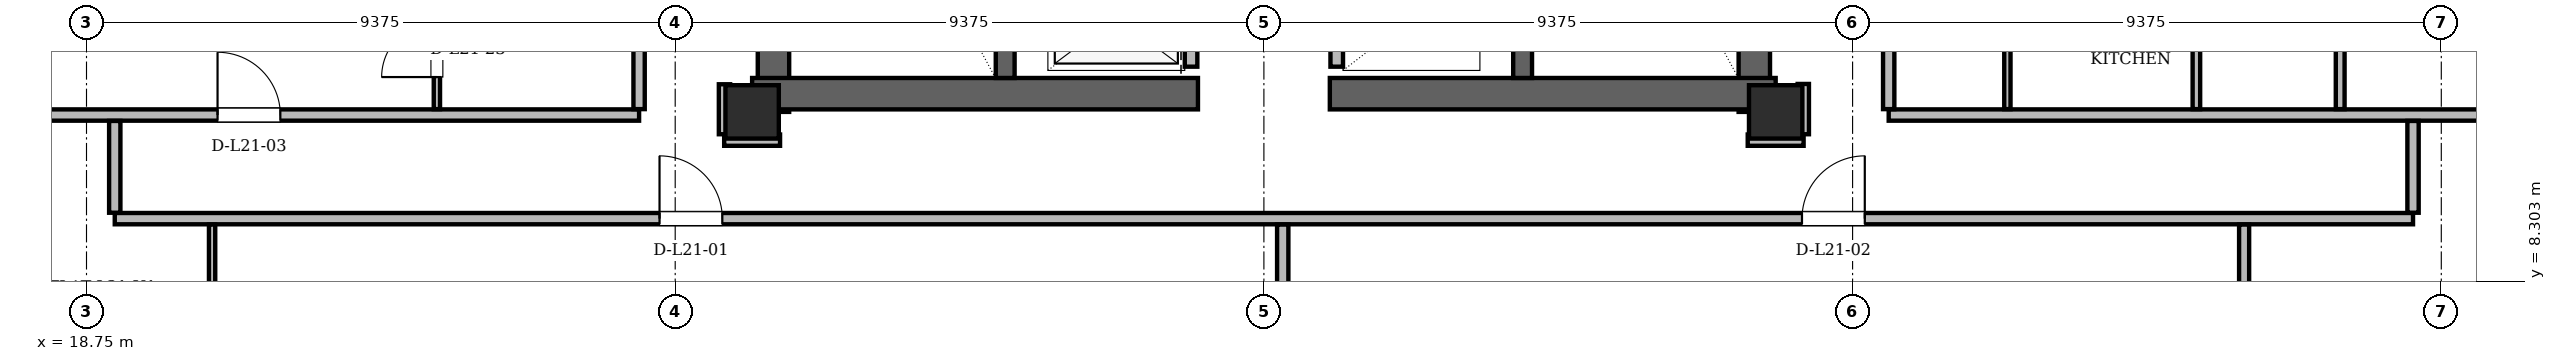
"""IFC4 building model, lengths in metres.
Left out: names, types, materials, properties, quantities, classifications, styles, units other than length and angle.
Written with IfcOpenShell. Run it as: python <this file> out.ifc"""

import sys

from ifc_helpers import new_model, si_unit, direction, frame, frame_2d, origin, origin_2d, place, context, subcontext, project, spatial, rectangle, hollow_rectangle, extrude, element, fill, save


model = new_model("IFC4")
c1 = context("Model", 3, precision=1e-05, world=origin(), true_north=direction((0.0, 1.0)))
c2 = subcontext(c1, "Body", "Model", "MODEL_VIEW")
j1 = project(units=[si_unit("LENGTHUNIT", "METRE"), si_unit("PLANEANGLEUNIT", "RADIAN")], contexts=[c1])
p1 = place(None, origin())
s1 = spatial("IfcSite", under=j1, at=p1, CompositionType="ELEMENT")
p2 = place(p1, origin())
s2 = spatial("IfcBuilding", under=s1, at=p2, CompositionType="ELEMENT")
p3 = place(p2, frame((0.0, 0.0, 82.5)))
s3 = spatial("IfcBuildingStorey", under=s2, at=p3, CompositionType="ELEMENT", Elevation=82.5)
for number, where, z_axis, x_axis in (
    (1, (29.35, 11.0, 0.0), (0.0, 0.0, 1.0), (1.0, 0.0, 0.0)),
    (2, (45.65, 11.0, 0.0), (0.0, 0.0, 1.0), (1.0, 0.0, 0.0)),
):
    element("IfcColumn", number, at=place(p3, frame(where, z_axis=z_axis, x_axis=x_axis)), inside=s3, PredefinedType="COLUMN", context=c2, shape_type="SweptSolid", body=[
        extrude(hollow_rectangle(XDim=0.85, YDim=0.85, WallThickness=0.07, at=origin_2d()), origin(), (0.0, 0.0, 1.0), 3.6),
    ])
for number, where, z_axis, x_axis in (
    (3, (29.69, 11.0, 0.0), (0.0, 0.0, 1.0), (0.0, 1.0, 0.0)),
    (4, (45.31, 11.0, 0.0), (0.0, 0.0, 1.0), (0.0, 1.0, 0.0)),
):
    element("IfcWall", number, at=place(p3, frame(where, z_axis=z_axis, x_axis=x_axis)), inside=s3, PredefinedType="SHEAR", context=c2, shape_type="SweptSolid", body=[
        extrude(rectangle(XDim=13.3, YDim=0.5, at=frame_2d((6.65, 0.0))), origin(), (0.0, 0.0, 1.0), 3.36),
    ])
for number, where, z_axis, x_axis in (
    (5, (29.35, 11.29, 0.0), (0.0, 0.0, 1.0), (1.0, 0.0, 0.0)),
    (6, (38.55, 11.29, 0.0), (0.0, 0.0, 1.0), (1.0, 0.0, 0.0)),
):
    element("IfcWall", number, at=place(p3, frame(where, z_axis=z_axis, x_axis=x_axis)), inside=s3, PredefinedType="SHEAR", context=c2, shape_type="SweptSolid", body=[
        extrude(rectangle(XDim=7.1, YDim=0.5, at=frame_2d((3.55, 0.0))), origin(), (0.0, 0.0, 1.0), 3.36),
    ])
for number, where, z_axis, x_axis in (
    (7, (33.38, 11.54, 0.0), (0.0, 0.0, 1.0), (0.0, 1.0, 0.0)),
    (8, (41.62, 11.54, 0.0), (0.0, 0.0, 1.0), (0.0, 1.0, 0.0)),
):
    element("IfcWall", number, at=place(p3, frame(where, z_axis=z_axis, x_axis=x_axis)), inside=s3, PredefinedType="SHEAR", context=c2, shape_type="SweptSolid", body=[
        extrude(rectangle(XDim=7.62, YDim=0.3, at=frame_2d((3.81, 0.0))), origin(), (0.0, 0.0, 1.0), 3.36),
    ])
for number, where, z_axis, x_axis in (
    (9, (14.025, 13.961, 0.0), (0.0, 0.0, 1.0), (0.5, -0.866, 0.0)),
    (10, (54.554, 2.839, 0.0), (0.0, 0.0, 1.0), (0.5, 0.866, 0.0)),
):
    element("IfcWall", number, at=place(p3, frame(where, z_axis=z_axis, x_axis=x_axis)), inside=s3, PredefinedType="SOLIDWALL", context=c2, shape_type="SweptSolid", body=[
        extrude(rectangle(XDim=12.842, YDim=0.34, at=frame_2d((6.421, 0.0))), origin(), (0.0, 0.0, 1.0), 2.578),
    ])
p4 = place(p3, frame((36.34, 11.72, 0.0), z_axis=(0.0, 0.0, 1.0), x_axis=(0.0, 1.0, 0.0)))
e11 = element("IfcWall", 11, at=p4, inside=s3, PredefinedType="PARTITIONING", context=c2, shape_type="SweptSolid", body=[
    extrude(rectangle(XDim=7.6, YDim=0.2, at=frame_2d((3.8, 0.0))), origin(), (0.0, 0.0, 1.0), 3.36),
])
p5 = place(p4, frame((0.255, 0.0, 0.0)))
e12 = element("IfcOpeningElement", 12, at=p5, cuts=e11, PredefinedType="OPENING", context=c2, shape_type="SweptSolid", body=[
    extrude(rectangle(XDim=1.05, YDim=2.15, at=frame_2d((0.525, 1.075))), frame((0.0, 0.1, 0.0), z_axis=(0.0, -1.0, 0.0), x_axis=(1.0, 0.0, 0.0)), (0.0, 0.0, 1.0), 0.2),
])
p6 = place(p4, frame((2.105, 0.0, 0.0)))
e13 = element("IfcOpeningElement", 13, at=p6, cuts=e11, PredefinedType="OPENING", context=c2, shape_type="SweptSolid", body=[
    extrude(rectangle(XDim=1.05, YDim=2.15, at=frame_2d((0.525, 1.075))), frame((0.0, 0.1, 0.0), z_axis=(0.0, -1.0, 0.0), x_axis=(1.0, 0.0, 0.0)), (0.0, 0.0, 1.0), 0.2),
])
p7 = place(p4, frame((3.955, 0.0, 0.0)))
e14 = element("IfcOpeningElement", 14, at=p7, cuts=e11, PredefinedType="OPENING", context=c2, shape_type="SweptSolid", body=[
    extrude(rectangle(XDim=1.05, YDim=2.15, at=frame_2d((0.525, 1.075))), frame((0.0, 0.1, 0.0), z_axis=(0.0, -1.0, 0.0), x_axis=(1.0, 0.0, 0.0)), (0.0, 0.0, 1.0), 0.2),
])
p8 = place(p3, frame((38.66, 11.72, 0.0), z_axis=(0.0, 0.0, 1.0), x_axis=(0.0, 1.0, 0.0)))
e15 = element("IfcWall", 15, at=p8, inside=s3, PredefinedType="PARTITIONING", context=c2, shape_type="SweptSolid", body=[
    extrude(rectangle(XDim=9.1, YDim=0.2, at=frame_2d((4.55, 0.0))), origin(), (0.0, 0.0, 1.0), 3.36),
])
p9 = place(p3, frame((19.2, 9.3, 0.0), z_axis=(0.0, 0.0, 1.0), x_axis=(1.0, 0.0, 0.0)))
e16 = element("IfcWall", 16, at=p9, inside=s3, PredefinedType="PARTITIONING", context=c2, shape_type="SweptSolid", body=[
    extrude(rectangle(XDim=36.6, YDim=0.18, at=frame_2d((18.3, 0.0))), origin(), (0.0, 0.0, 1.0), 2.814),
])
p10 = place(p9, frame((8.676, 0.0, 0.0)))
e17 = element("IfcOpeningElement", 17, at=p10, cuts=e16, PredefinedType="OPENING", context=c2, shape_type="SweptSolid", body=[
    extrude(rectangle(XDim=1.0, YDim=2.18, at=frame_2d((0.5, 1.09))), frame((0.0, 0.09, 0.0), z_axis=(0.0, -1.0, 0.0), x_axis=(1.0, 0.0, 0.0)), (0.0, 0.0, 1.0), 0.18),
])
p11 = place(p9, frame((26.869, 0.0, 0.0)))
e18 = element("IfcOpeningElement", 18, at=p11, cuts=e16, PredefinedType="OPENING", context=c2, shape_type="SweptSolid", body=[
    extrude(rectangle(XDim=1.0, YDim=2.18, at=frame_2d((0.5, 1.09))), frame((0.0, 0.09, 0.0), z_axis=(0.0, -1.0, 0.0), x_axis=(1.0, 0.0, 0.0)), (0.0, 0.0, 1.0), 0.18),
])
for number, where, z_axis, x_axis in (
    (19, (28.905, 10.55, 0.0), (0.0, 0.0, 1.0), (1.0, 0.0, 0.0)),
    (20, (45.205, 10.55, 0.0), (0.0, 0.0, 1.0), (1.0, 0.0, 0.0)),
):
    element("IfcWall", number, at=place(p3, frame(where, z_axis=z_axis, x_axis=x_axis)), inside=s3, PredefinedType="PARTITIONING", context=c2, shape_type="SweptSolid", body=[
        extrude(rectangle(XDim=0.89, YDim=0.18, at=frame_2d((0.445, 0.0))), origin(), (0.0, 0.0, 1.0), 3.36),
    ])
p12 = place(p3, frame((15.964, 10.95, 0.0), z_axis=(0.0, 0.0, 1.0), x_axis=(1.0, 0.0, 0.0)))
e21 = element("IfcWall", 21, at=p12, inside=s3, PredefinedType="PARTITIONING", context=c2, shape_type="SweptSolid", body=[
    extrude(rectangle(XDim=11.586, YDim=0.18, at=frame_2d((5.793, 0.0))), origin(), (0.0, 0.0, 1.0), 3.36),
])
p13 = place(p12, frame((4.873, 0.0, 0.0)))
e22 = element("IfcOpeningElement", 22, at=p13, cuts=e21, PredefinedType="OPENING", context=c2, shape_type="SweptSolid", body=[
    extrude(rectangle(XDim=1.0, YDim=2.18, at=frame_2d((0.5, 1.09))), frame((0.0, 0.09, 0.0), z_axis=(0.0, -1.0, 0.0), x_axis=(1.0, 0.0, 0.0)), (0.0, 0.0, 1.0), 0.18),
])
p14 = place(p3, frame((47.45, 10.95, 0.0), z_axis=(0.0, 0.0, 1.0), x_axis=(1.0, 0.0, 0.0)))
e23 = element("IfcWall", 23, at=p14, inside=s3, PredefinedType="PARTITIONING", context=c2, shape_type="SweptSolid", body=[
    extrude(rectangle(XDim=11.586, YDim=0.18, at=frame_2d((5.793, 0.0))), origin(), (0.0, 0.0, 1.0), 3.36),
])
p15 = place(p3, frame((19.2, 9.394, 0.0), z_axis=(0.0, 0.0, 1.0), x_axis=(0.0, 1.0, 0.0)))
e24 = element("IfcWall", 24, at=p15, inside=s3, PredefinedType="PARTITIONING", context=c2, shape_type="SweptSolid", body=[
    extrude(rectangle(XDim=1.462, YDim=0.18, at=frame_2d((0.731, 0.0))), origin(), (0.0, 0.0, 1.0), 3.36),
])
p16 = place(p3, frame((20.75, 3.25, 0.0), z_axis=(0.0, 0.0, 1.0), x_axis=(0.0, 1.0, 0.0)))
e25 = element("IfcWall", 25, at=p16, inside=s3, PredefinedType="PARTITIONING", context=c2, shape_type="SweptSolid", body=[
    extrude(rectangle(XDim=5.956, YDim=0.1, at=frame_2d((2.978, 0.0))), origin(), (0.0, 0.0, 1.0), 3.36),
])
p17 = place(p16, frame((2.455, 0.0, 0.0)))
e26 = element("IfcOpeningElement", 26, at=p17, cuts=e25, PredefinedType="OPENING", context=c2, shape_type="SweptSolid", body=[
    extrude(rectangle(XDim=0.88, YDim=2.08, at=frame_2d((0.44, 1.04))), frame((0.0, 0.05, 0.0), z_axis=(0.0, -1.0, 0.0), x_axis=(1.0, 0.0, 0.0)), (0.0, 0.0, 1.0), 0.1),
])
p18 = place(p3, frame((24.33, 11.044, 0.0), z_axis=(0.0, 0.0, 1.0), x_axis=(0.0, 1.0, 0.0)))
e27 = element("IfcWall", 27, at=p18, inside=s3, PredefinedType="PARTITIONING", context=c2, shape_type="SweptSolid", body=[
    extrude(rectangle(XDim=4.862, YDim=0.1, at=frame_2d((2.431, 0.0))), origin(), (0.0, 0.0, 1.0), 2.814),
])
p19 = place(p18, frame((0.511, 0.0, 0.0)))
e28 = element("IfcOpeningElement", 28, at=p19, cuts=e27, PredefinedType="OPENING", context=c2, shape_type="SweptSolid", body=[
    extrude(rectangle(XDim=0.88, YDim=2.08, at=frame_2d((0.44, 1.04))), frame((0.0, 0.05, 0.0), z_axis=(0.0, -1.0, 0.0), x_axis=(1.0, 0.0, 0.0)), (0.0, 0.0, 1.0), 0.1),
])
p20 = place(p18, frame((3.031, 0.0, 0.0)))
e29 = element("IfcOpeningElement", 29, at=p20, cuts=e27, PredefinedType="OPENING", context=c2, shape_type="SweptSolid", body=[
    extrude(rectangle(XDim=0.95, YDim=2.1, at=frame_2d((0.475, 1.05))), frame((0.0, 0.05, 0.0), z_axis=(0.0, -1.0, 0.0), x_axis=(1.0, 0.0, 0.0)), (0.0, 0.0, 1.0), 0.1),
])
p21 = place(p3, frame((27.55, 11.044, 0.0), z_axis=(0.0, 0.0, 1.0), x_axis=(0.0, 1.0, 0.0)))
e30 = element("IfcWall", 30, at=p21, inside=s3, PredefinedType="PARTITIONING", context=c2, shape_type="SweptSolid", body=[
    extrude(rectangle(XDim=14.832, YDim=0.18, at=frame_2d((7.416, 0.0))), origin(), (0.0, 0.0, 1.0), 2.814),
])
p22 = place(p21, frame((6.208, 0.0, 0.0)))
e31 = element("IfcOpeningElement", 31, at=p22, cuts=e30, PredefinedType="OPENING", context=c2, shape_type="SweptSolid", body=[
    extrude(rectangle(XDim=1.0, YDim=2.18, at=frame_2d((0.5, 1.09))), frame((0.0, 0.09, 0.0), z_axis=(0.0, -1.0, 0.0), x_axis=(1.0, 0.0, 0.0)), (0.0, 0.0, 1.0), 0.18),
])
p23 = place(p3, frame((28.91, 10.644, 0.0), z_axis=(0.0, 0.0, 1.0), x_axis=(0.0, 1.0, 0.0)))
e32 = element("IfcWall", 32, at=p23, inside=s3, PredefinedType="PARTITIONING", context=c2, shape_type="SweptSolid", body=[
    extrude(rectangle(XDim=0.796, YDim=0.18, at=frame_2d((0.398, 0.0))), origin(), (0.0, 0.0, 1.0), 2.814),
])
p24 = place(p3, frame((37.8, 3.013, 0.0), z_axis=(0.0, 0.0, 1.0), x_axis=(0.0, 1.0, 0.0)))
e33 = element("IfcWall", 33, at=p24, inside=s3, PredefinedType="PARTITIONING", context=c2, shape_type="SweptSolid", body=[
    extrude(rectangle(XDim=6.193, YDim=0.18, at=frame_2d((3.096, 0.0))), origin(), (0.0, 0.0, 1.0), 3.36),
])
p25 = place(p3, frame((46.09, 10.644, 0.0), z_axis=(0.0, 0.0, 1.0), x_axis=(0.0, 1.0, 0.0)))
e34 = element("IfcWall", 34, at=p25, inside=s3, PredefinedType="PARTITIONING", context=c2, shape_type="SweptSolid", body=[
    extrude(rectangle(XDim=0.801, YDim=0.18, at=frame_2d((0.4, 0.0))), origin(), (0.0, 0.0, 1.0), 2.814),
])
p26 = place(p3, frame((47.45, 11.044, 0.0), z_axis=(0.0, 0.0, 1.0), x_axis=(0.0, 1.0, 0.0)))
e35 = element("IfcWall", 35, at=p26, inside=s3, PredefinedType="PARTITIONING", context=c2, shape_type="SweptSolid", body=[
    extrude(rectangle(XDim=14.832, YDim=0.18, at=frame_2d((7.416, 0.0))), origin(), (0.0, 0.0, 1.0), 2.814),
])
p27 = place(p26, frame((4.578, 0.0, 0.0)))
e36 = element("IfcOpeningElement", 36, at=p27, cuts=e35, PredefinedType="OPENING", context=c2, shape_type="SweptSolid", body=[
    extrude(rectangle(XDim=1.0, YDim=2.18, at=frame_2d((0.5, 1.09))), frame((0.0, 0.09, 0.0), z_axis=(0.0, -1.0, 0.0), x_axis=(1.0, 0.0, 0.0)), (0.0, 0.0, 1.0), 0.18),
])
p28 = place(p26, frame((9.09, 0.0, 0.0)))
e37 = element("IfcOpeningElement", 37, at=p28, cuts=e35, PredefinedType="OPENING", context=c2, shape_type="SweptSolid", body=[
    extrude(rectangle(XDim=1.0, YDim=2.18, at=frame_2d((0.5, 1.09))), frame((0.0, 0.09, 0.0), z_axis=(0.0, -1.0, 0.0), x_axis=(1.0, 0.0, 0.0)), (0.0, 0.0, 1.0), 0.18),
])
p29 = place(p26, frame((13.539, 0.0, 0.0)))
e38 = element("IfcOpeningElement", 38, at=p29, cuts=e35, PredefinedType="OPENING", context=c2, shape_type="SweptSolid", body=[
    extrude(rectangle(XDim=1.0, YDim=2.18, at=frame_2d((0.5, 1.09))), frame((0.0, 0.09, 0.0), z_axis=(0.0, -1.0, 0.0), x_axis=(1.0, 0.0, 0.0)), (0.0, 0.0, 1.0), 0.18),
])
p30 = place(p3, frame((49.34, 11.044, 0.0), z_axis=(0.0, 0.0, 1.0), x_axis=(0.0, 1.0, 0.0)))
e39 = element("IfcWall", 39, at=p30, inside=s3, PredefinedType="PARTITIONING", context=c2, shape_type="SweptSolid", body=[
    extrude(rectangle(XDim=2.792, YDim=0.1, at=frame_2d((1.396, 0.0))), origin(), (0.0, 0.0, 1.0), 2.814),
])
p31 = place(p3, frame((52.35, 11.044, 0.0), z_axis=(0.0, 0.0, 1.0), x_axis=(0.0, 1.0, 0.0)))
e40 = element("IfcWall", 40, at=p31, inside=s3, PredefinedType="PARTITIONING", context=c2, shape_type="SweptSolid", body=[
    extrude(rectangle(XDim=2.792, YDim=0.12, at=frame_2d((1.396, 0.0))), origin(), (0.0, 0.0, 1.0), 2.814),
])
p32 = place(p3, frame((53.11, 3.013, 0.0), z_axis=(0.0, 0.0, 1.0), x_axis=(0.0, 1.0, 0.0)))
e41 = element("IfcWall", 41, at=p32, inside=s3, PredefinedType="PARTITIONING", context=c2, shape_type="SweptSolid", body=[
    extrude(rectangle(XDim=6.193, YDim=0.16, at=frame_2d((3.096, 0.0))), origin(), (0.0, 0.0, 1.0), 2.814),
])
p33 = place(p32, frame((2.691, 0.0, 0.0)))
e42 = element("IfcOpeningElement", 42, at=p33, cuts=e41, PredefinedType="OPENING", context=c2, shape_type="SweptSolid", body=[
    extrude(rectangle(XDim=0.88, YDim=2.08, at=frame_2d((0.44, 1.04))), frame((0.0, 0.08, 0.0), z_axis=(0.0, -1.0, 0.0), x_axis=(1.0, 0.0, 0.0)), (0.0, 0.0, 1.0), 0.16),
])
p34 = place(p3, frame((54.64, 11.044, 0.0), z_axis=(0.0, 0.0, 1.0), x_axis=(0.0, 1.0, 0.0)))
e43 = element("IfcWall", 43, at=p34, inside=s3, PredefinedType="PARTITIONING", context=c2, shape_type="SweptSolid", body=[
    extrude(rectangle(XDim=2.792, YDim=0.14, at=frame_2d((1.396, 0.0))), origin(), (0.0, 0.0, 1.0), 2.814),
])
p35 = place(p3, frame((55.8, 9.394, 0.0), z_axis=(0.0, 0.0, 1.0), x_axis=(0.0, 1.0, 0.0)))
e44 = element("IfcWall", 44, at=p35, inside=s3, PredefinedType="PARTITIONING", context=c2, shape_type="SweptSolid", body=[
    extrude(rectangle(XDim=1.462, YDim=0.18, at=frame_2d((0.731, 0.0))), origin(), (0.0, 0.0, 1.0), 3.36),
])
p36 = place(p10, origin())
e45 = element("IfcDoor", 45, at=p36, inside=s3, OperationType="SINGLE_SWING_LEFT", PredefinedType="DOOR", context=c2, shape_type="SweptSolid", body=[
    extrude(rectangle(XDim=1.0, YDim=2.18, at=frame_2d((0.5, 1.09))), frame((0.0, 0.025, 0.0), z_axis=(0.0, -1.0, 0.0), x_axis=(1.0, 0.0, 0.0)), (0.0, 0.0, 1.0), 0.05),
])
fill(e17, e45)
p37 = place(p11, origin())
e46 = element("IfcDoor", 46, at=p37, inside=s3, OperationType="SINGLE_SWING_RIGHT", PredefinedType="DOOR", context=c2, shape_type="SweptSolid", body=[
    extrude(rectangle(XDim=1.0, YDim=2.18, at=frame_2d((0.5, 1.09))), frame((0.0, 0.025, 0.0), z_axis=(0.0, -1.0, 0.0), x_axis=(1.0, 0.0, 0.0)), (0.0, 0.0, 1.0), 0.05),
])
fill(e18, e46)
p38 = place(p13, origin())
e47 = element("IfcDoor", 47, at=p38, inside=s3, OperationType="SINGLE_SWING_LEFT", PredefinedType="DOOR", context=c2, shape_type="SweptSolid", body=[
    extrude(rectangle(XDim=1.0, YDim=2.18, at=frame_2d((0.5, 1.09))), frame((0.0, 0.025, 0.0), z_axis=(0.0, -1.0, 0.0), x_axis=(1.0, 0.0, 0.0)), (0.0, 0.0, 1.0), 0.05),
])
fill(e22, e47)
p39 = place(p19, origin())
e48 = element("IfcDoor", 48, at=p39, inside=s3, OperationType="SINGLE_SWING_LEFT", PredefinedType="DOOR", context=c2, shape_type="SweptSolid", body=[
    extrude(rectangle(XDim=0.88, YDim=2.08, at=frame_2d((0.44, 1.04))), frame((0.0, 0.025, 0.0), z_axis=(0.0, -1.0, 0.0), x_axis=(1.0, 0.0, 0.0)), (0.0, 0.0, 1.0), 0.05),
])
fill(e28, e48)
save(model, sys.argv[1])
